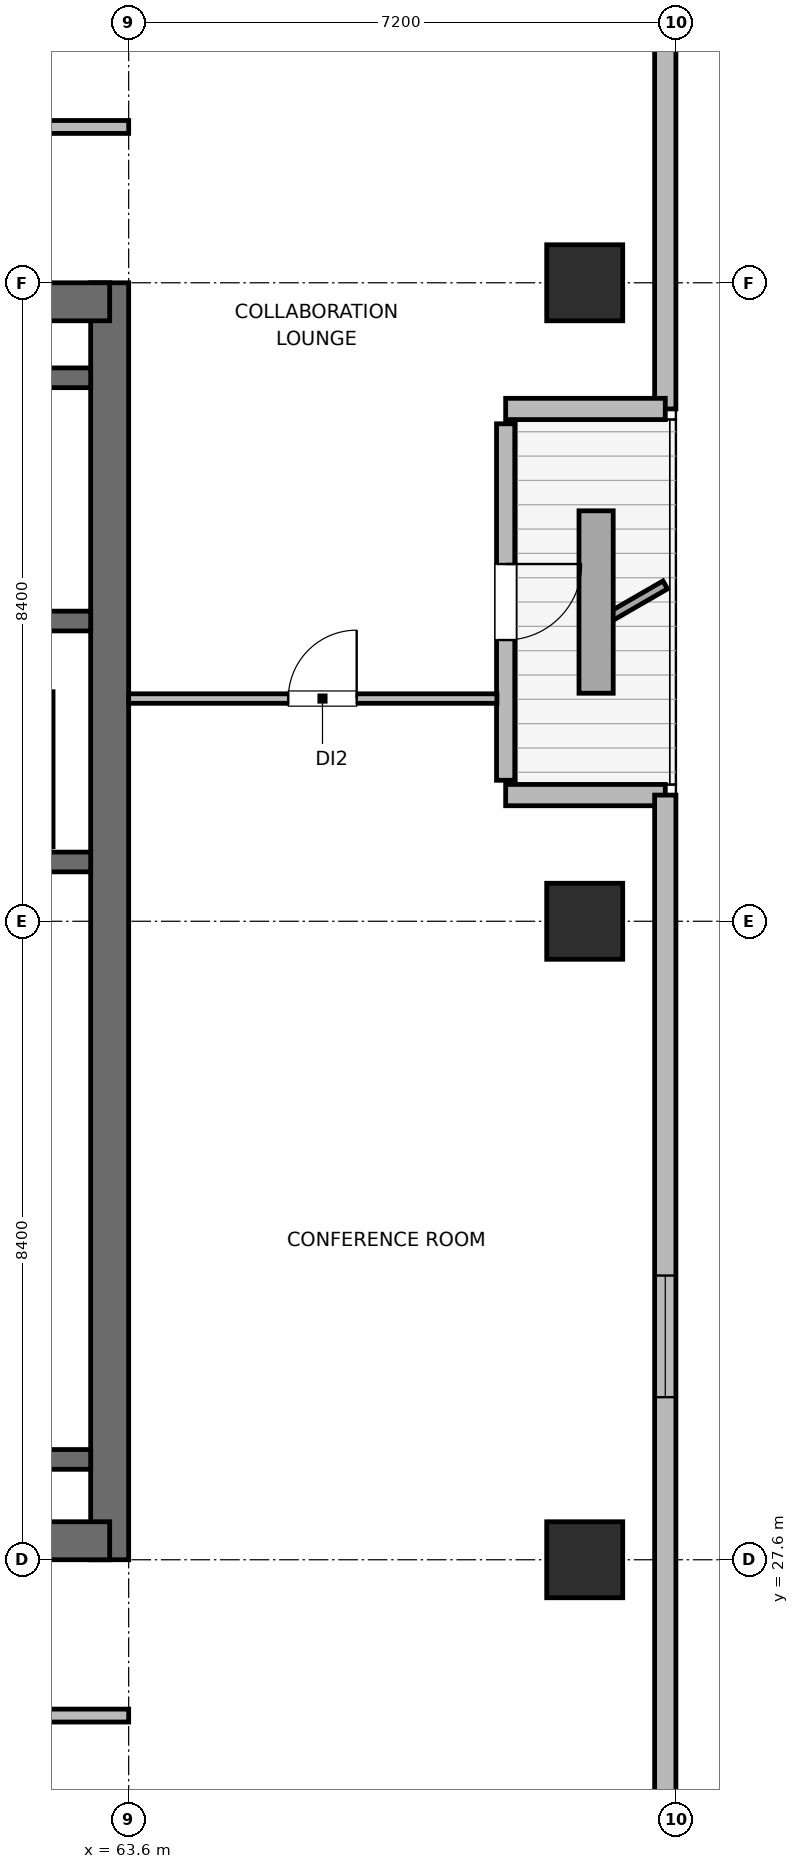
"""IFC4 building model, lengths in metres.
Left out: names, types, materials, properties, quantities, classifications, styles, units other than length and angle.
Written with IfcOpenShell. Run it as: python <this file> out.ifc"""

import sys

from ifc_helpers import new_model, si_unit, direction, frame, frame_2d, origin, origin_2d, place, context, subcontext, project, spatial, rectangle, extrude, element, fill, save


model = new_model("IFC4")
c1 = context("Model", 3, precision=1e-05, world=origin(), true_north=direction((0.0, 1.0)))
c2 = subcontext(c1, "Body", "Model", "MODEL_VIEW")
j1 = project(units=[si_unit("LENGTHUNIT", "METRE"), si_unit("PLANEANGLEUNIT", "RADIAN")], contexts=[c1])
p1 = place(None, origin())
s1 = spatial("IfcSite", under=j1, at=p1, CompositionType="ELEMENT")
p2 = place(p1, origin())
s2 = spatial("IfcBuilding", under=s1, at=p2, CompositionType="ELEMENT")
p3 = place(p2, frame((0.0, 0.0, 274.5)))
s3 = spatial("IfcBuildingStorey", under=s2, at=p3, CompositionType="ELEMENT", Elevation=274.5)
p4 = place(p3, frame((63.35, 27.6, 0.0), z_axis=(0.0, 0.0, 1.0), x_axis=(0.0, 1.0, 0.0)))
e1 = element("IfcWall", 1, at=p4, inside=s3, PredefinedType="SHEAR", context=c2, shape_type="SweptSolid", body=[
    extrude(rectangle(XDim=16.8, YDim=0.5, at=frame_2d((8.4, 0.0))), origin(), (0.0, 0.0, 1.0), 3.9),
])
p5 = place(p3, frame((53.85, 27.85, 0.0), z_axis=(0.0, 0.0, 1.0), x_axis=(1.0, 0.0, 0.0)))
e2 = element("IfcWall", 2, at=p5, inside=s3, PredefinedType="SHEAR", context=c2, shape_type="SweptSolid", body=[
    extrude(rectangle(XDim=9.5, YDim=0.5, at=frame_2d((4.75, 0.0))), origin(), (0.0, 0.0, 1.0), 3.9),
])
p6 = place(p5, frame((4.025, 0.0, 0.0)))
e3 = element("IfcOpeningElement", 3, at=p6, cuts=e2, PredefinedType="OPENING", context=c2, shape_type="SweptSolid", body=[
    extrude(rectangle(XDim=1.05, YDim=2.04, at=frame_2d((0.525, 1.02))), frame((0.0, 0.26, 0.0), z_axis=(0.0, -1.0, 0.0), x_axis=(1.0, 0.0, 0.0)), (0.0, 0.0, 1.0), 0.52),
])
p7 = place(p3, frame((53.85, 44.15, 0.0), z_axis=(0.0, 0.0, 1.0), x_axis=(1.0, 0.0, 0.0)))
e4 = element("IfcWall", 4, at=p7, inside=s3, PredefinedType="SHEAR", context=c2, shape_type="SweptSolid", body=[
    extrude(rectangle(XDim=9.5, YDim=0.5, at=frame_2d((4.75, 0.0))), origin(), (0.0, 0.0, 1.0), 3.9),
])
for number, where, z_axis, x_axis in (
    (5, (58.89, 28.92, 0.0), (0.0, 0.0, 1.0), (1.0, 0.0, 0.0)),
    (6, (58.89, 36.78, 0.0), (0.0, 0.0, 1.0), (1.0, 0.0, 0.0)),
):
    element("IfcWall", number, at=place(p3, frame(where, z_axis=z_axis, x_axis=x_axis)), inside=s3, PredefinedType="SHEAR", context=c2, shape_type="SweptSolid", body=[
        extrude(rectangle(XDim=4.21, YDim=0.26, at=frame_2d((2.105, 0.0))), origin(), (0.0, 0.0, 1.0), 3.9),
    ])
p8 = place(p3, frame((54.1, 39.95, 0.0), z_axis=(0.0, 0.0, 1.0), x_axis=(1.0, 0.0, 0.0)))
e7 = element("IfcWall", 7, at=p8, inside=s3, PredefinedType="SHEAR", context=c2, shape_type="SweptSolid", body=[
    extrude(rectangle(XDim=9.0, YDim=0.26, at=frame_2d((4.5, 0.0))), origin(), (0.0, 0.0, 1.0), 3.9),
])
p9 = place(p8, frame((1.1, 0.0, 0.0)))
e8 = element("IfcOpeningElement", 8, at=p9, cuts=e7, PredefinedType="OPENING", context=c2, shape_type="SweptSolid", body=[
    extrude(rectangle(XDim=1.0, YDim=2.04, at=frame_2d((0.5, 1.02))), frame((0.0, 0.14, 0.0), z_axis=(0.0, -1.0, 0.0), x_axis=(1.0, 0.0, 0.0)), (0.0, 0.0, 1.0), 0.28),
])
p10 = place(p3, frame((54.1, 43.15, 0.0), z_axis=(0.0, 0.0, 1.0), x_axis=(1.0, 0.0, 0.0)))
e9 = element("IfcWall", 9, at=p10, inside=s3, PredefinedType="SHEAR", context=c2, shape_type="SweptSolid", body=[
    extrude(rectangle(XDim=9.0, YDim=0.26, at=frame_2d((4.5, 0.0))), origin(), (0.0, 0.0, 1.0), 3.9),
])
for number, where, z_axis, x_axis in (
    (10, (69.6, 27.6, 0.0), (0.0, 0.0, 1.0), (1.0, 0.0, 0.0)),
    (11, (69.6, 36.0, 0.0), (0.0, 0.0, 1.0), (1.0, 0.0, 0.0)),
    (12, (69.6, 44.4, 0.0), (0.0, 0.0, 1.0), (1.0, 0.0, 0.0)),
):
    element("IfcColumn", number, at=place(p3, frame(where, z_axis=z_axis, x_axis=x_axis)), inside=s3, PredefinedType="COLUMN", context=c2, shape_type="SweptSolid", body=[
        extrude(rectangle(XDim=1.0, YDim=1.0, at=origin_2d()), origin(), (0.0, 0.0, 1.0), 3.9),
    ])
p11 = place(p3, frame((70.66, 48.582, 0.0), z_axis=(0.0, 0.0, 1.0), x_axis=(0.0, -1.0, 0.0)))
e13 = element("IfcWall", 13, at=p11, inside=s3, PredefinedType="SOLIDWALL", context=c2, shape_type="SweptSolid", body=[
    extrude(rectangle(XDim=5.842, YDim=0.28, at=frame_2d((2.921, 0.0))), origin(), (0.0, 0.0, 1.0), 3.68),
])
p12 = place(p3, frame((70.66, 42.74, 0.0), z_axis=(0.0, 0.0, 1.0), x_axis=(-1.0, 0.0, 0.0)))
e14 = element("IfcWall", 14, at=p12, inside=s3, PredefinedType="SOLIDWALL", context=c2, shape_type="SweptSolid", body=[
    extrude(rectangle(XDim=2.1, YDim=0.28, at=frame_2d((1.05, 0.0))), origin(), (0.0, 0.0, 1.0), 3.126),
])
p13 = place(p3, frame((68.56, 42.545, 0.0), z_axis=(0.0, 0.0, 1.0), x_axis=(0.0, -1.0, 0.0)))
e15 = element("IfcWall", 15, at=p13, inside=s3, PredefinedType="SOLIDWALL", context=c2, shape_type="SweptSolid", body=[
    extrude(rectangle(XDim=4.69, YDim=0.24, at=frame_2d((2.345, 0.0))), origin(), (0.0, 0.0, 1.0), 3.311),
])
p14 = place(p13, frame((1.845, 0.0, 0.0)))
e16 = element("IfcOpeningElement", 16, at=p14, cuts=e15, PredefinedType="OPENING", context=c2, shape_type="SweptSolid", body=[
    extrude(rectangle(XDim=1.0, YDim=2.02, at=frame_2d((0.5, 1.01))), frame((0.0, 0.13, 0.0), z_axis=(0.0, -1.0, 0.0), x_axis=(1.0, 0.0, 0.0)), (0.0, 0.0, 1.0), 0.26),
])
p15 = place(p3, frame((68.56, 37.66, 0.0), z_axis=(0.0, 0.0, 1.0), x_axis=(1.0, 0.0, 0.0)))
e17 = element("IfcWall", 17, at=p15, inside=s3, PredefinedType="SOLIDWALL", context=c2, shape_type="SweptSolid", body=[
    extrude(rectangle(XDim=2.1, YDim=0.28, at=frame_2d((1.05, 0.0))), origin(), (0.0, 0.0, 1.0), 3.126),
])
p16 = place(p3, frame((70.66, 37.66, 0.0), z_axis=(0.0, 0.0, 1.0), x_axis=(0.0, -1.0, 0.0)))
e18 = element("IfcWall", 18, at=p16, inside=s3, PredefinedType="SOLIDWALL", context=c2, shape_type="SweptSolid", body=[
    extrude(rectangle(XDim=14.241, YDim=0.28, at=frame_2d((7.121, 0.0))), origin(), (0.0, 0.0, 1.0), 3.68),
])
p17 = place(p16, frame((6.321, 0.0, 0.85)))
e19 = element("IfcOpeningElement", 19, at=p17, cuts=e18, PredefinedType="OPENING", context=c2, shape_type="SweptSolid", body=[
    extrude(rectangle(XDim=1.6, YDim=1.0, at=frame_2d((0.8, 0.5))), frame((0.0, 0.15, 0.0), z_axis=(0.0, -1.0, 0.0), x_axis=(1.0, 0.0, 0.0)), (0.0, 0.0, 1.0), 0.3),
])
p18 = place(p3, frame((62.5, 36.98, 0.0), z_axis=(0.0, 0.0, 1.0), x_axis=(0.0, 1.0, 0.0)))
e20 = element("IfcWall", 20, at=p18, inside=s3, PredefinedType="PARTITIONING", context=c2, shape_type="SweptSolid", body=[
    extrude(rectangle(XDim=2.04, YDim=0.21, at=frame_2d((1.02, 0.0))), origin(), (0.0, 0.0, 1.0), 3.68),
])
p19 = place(p3, frame((30.35, 25.55, 0.0), z_axis=(0.0, 0.0, 1.0), x_axis=(1.0, 0.0, 0.0)))
e21 = element("IfcWall", 21, at=p19, inside=s3, PredefinedType="PARTITIONING", context=c2, shape_type="SweptSolid", body=[
    extrude(rectangle(XDim=33.25, YDim=0.17, at=frame_2d((16.625, 0.0))), origin(), (0.0, 0.0, 1.0), 3.68),
])
p20 = place(p19, frame((5.95, 0.0, 0.0)))
e22 = element("IfcOpeningElement", 22, at=p20, cuts=e21, PredefinedType="OPENING", context=c2, shape_type="SweptSolid", body=[
    extrude(rectangle(XDim=0.95, YDim=2.04, at=frame_2d((0.475, 1.02))), frame((0.0, 0.095, 0.0), z_axis=(0.0, -1.0, 0.0), x_axis=(1.0, 0.0, 0.0)), (0.0, 0.0, 1.0), 0.19),
])
p21 = place(p19, frame((22.575, 0.0, 0.0)))
e23 = element("IfcOpeningElement", 23, at=p21, cuts=e21, PredefinedType="OPENING", context=c2, shape_type="SweptSolid", body=[
    extrude(rectangle(XDim=0.95, YDim=2.04, at=frame_2d((0.475, 1.02))), frame((0.0, 0.095, 0.0), z_axis=(0.0, -1.0, 0.0), x_axis=(1.0, 0.0, 0.0)), (0.0, 0.0, 1.0), 0.19),
])
p22 = place(p3, frame((30.35, 46.45, 0.0), z_axis=(0.0, 0.0, 1.0), x_axis=(1.0, 0.0, 0.0)))
e24 = element("IfcWall", 24, at=p22, inside=s3, PredefinedType="PARTITIONING", context=c2, shape_type="SweptSolid", body=[
    extrude(rectangle(XDim=33.25, YDim=0.17, at=frame_2d((16.625, 0.0))), origin(), (0.0, 0.0, 1.0), 3.68),
])
p23 = place(p22, frame((2.35, 0.0, 0.0)))
e25 = element("IfcOpeningElement", 25, at=p23, cuts=e24, PredefinedType="OPENING", context=c2, shape_type="SweptSolid", body=[
    extrude(rectangle(XDim=0.95, YDim=2.04, at=frame_2d((0.475, 1.02))), frame((0.0, 0.095, 0.0), z_axis=(0.0, -1.0, 0.0), x_axis=(1.0, 0.0, 0.0)), (0.0, 0.0, 1.0), 0.19),
])
p24 = place(p22, frame((7.275, 0.0, 0.0)))
e26 = element("IfcOpeningElement", 26, at=p24, cuts=e24, PredefinedType="OPENING", context=c2, shape_type="SweptSolid", body=[
    extrude(rectangle(XDim=0.95, YDim=2.04, at=frame_2d((0.475, 1.02))), frame((0.0, 0.095, 0.0), z_axis=(0.0, -1.0, 0.0), x_axis=(1.0, 0.0, 0.0)), (0.0, 0.0, 1.0), 0.19),
])
p25 = place(p22, frame((12.475, 0.0, 0.0)))
e27 = element("IfcOpeningElement", 27, at=p25, cuts=e24, PredefinedType="OPENING", context=c2, shape_type="SweptSolid", body=[
    extrude(rectangle(XDim=0.95, YDim=2.04, at=frame_2d((0.475, 1.02))), frame((0.0, 0.095, 0.0), z_axis=(0.0, -1.0, 0.0), x_axis=(1.0, 0.0, 0.0)), (0.0, 0.0, 1.0), 0.19),
])
p26 = place(p22, frame((18.175, 0.0, 0.0)))
e28 = element("IfcOpeningElement", 28, at=p26, cuts=e24, PredefinedType="OPENING", context=c2, shape_type="SweptSolid", body=[
    extrude(rectangle(XDim=0.95, YDim=2.04, at=frame_2d((0.475, 1.02))), frame((0.0, 0.095, 0.0), z_axis=(0.0, -1.0, 0.0), x_axis=(1.0, 0.0, 0.0)), (0.0, 0.0, 1.0), 0.19),
])
p27 = place(p22, frame((23.175, 0.0, 0.0)))
e29 = element("IfcOpeningElement", 29, at=p27, cuts=e24, PredefinedType="OPENING", context=c2, shape_type="SweptSolid", body=[
    extrude(rectangle(XDim=0.95, YDim=2.04, at=frame_2d((0.475, 1.02))), frame((0.0, 0.095, 0.0), z_axis=(0.0, -1.0, 0.0), x_axis=(1.0, 0.0, 0.0)), (0.0, 0.0, 1.0), 0.19),
])
p28 = place(p22, frame((27.675, 0.0, 0.0)))
e30 = element("IfcOpeningElement", 30, at=p28, cuts=e24, PredefinedType="OPENING", context=c2, shape_type="SweptSolid", body=[
    extrude(rectangle(XDim=0.95, YDim=2.04, at=frame_2d((0.475, 1.02))), frame((0.0, 0.095, 0.0), z_axis=(0.0, -1.0, 0.0), x_axis=(1.0, 0.0, 0.0)), (0.0, 0.0, 1.0), 0.19),
])
p29 = place(p22, frame((31.275, 0.0, 0.0)))
e31 = element("IfcOpeningElement", 31, at=p29, cuts=e24, PredefinedType="OPENING", context=c2, shape_type="SweptSolid", body=[
    extrude(rectangle(XDim=0.95, YDim=2.04, at=frame_2d((0.475, 1.02))), frame((0.0, 0.095, 0.0), z_axis=(0.0, -1.0, 0.0), x_axis=(1.0, 0.0, 0.0)), (0.0, 0.0, 1.0), 0.19),
])
p30 = place(p3, frame((63.6, 38.93, 0.0), z_axis=(0.0, 0.0, 1.0), x_axis=(1.0, 0.0, 0.0)))
e32 = element("IfcWall", 32, at=p30, inside=s3, PredefinedType="PARTITIONING", context=c2, shape_type="SweptSolid", body=[
    extrude(rectangle(XDim=4.845, YDim=0.125, at=frame_2d((2.422, 0.0))), origin(), (0.0, 0.0, 1.0), 3.68),
])
p31 = place(p30, frame((2.1, 0.0, 0.0)))
e33 = element("IfcOpeningElement", 33, at=p31, cuts=e32, PredefinedType="OPENING", context=c2, shape_type="SweptSolid", body=[
    extrude(rectangle(XDim=0.9, YDim=2.02, at=frame_2d((0.45, 1.01))), frame((0.0, 0.073, 0.0), z_axis=(0.0, -1.0, 0.0), x_axis=(1.0, 0.0, 0.0)), (0.0, 0.0, 1.0), 0.145),
])
p32 = place(p14, origin())
e34 = element("IfcDoor", 34, at=p32, inside=s3, OperationType="SINGLE_SWING_LEFT", PredefinedType="DOOR", context=c2, shape_type="SweptSolid", body=[
    extrude(rectangle(XDim=1.0, YDim=2.02, at=frame_2d((0.5, 1.01))), frame((0.0, 0.025, 0.0), z_axis=(0.0, -1.0, 0.0), x_axis=(1.0, 0.0, 0.0)), (0.0, 0.0, 1.0), 0.05),
])
fill(e16, e34)
p33 = place(p17, origin())
e35 = element("IfcWindow", 35, at=p33, inside=s3, PartitioningType="SINGLE_PANEL", PredefinedType="WINDOW", context=c2, shape_type="SweptSolid", body=[
    extrude(rectangle(XDim=1.6, YDim=1.0, at=frame_2d((0.8, 0.5))), frame((0.0, 0.03, 0.0), z_axis=(0.0, -1.0, 0.0), x_axis=(1.0, 0.0, 0.0)), (0.0, 0.0, 1.0), 0.06),
])
fill(e19, e35)
p34 = place(p31, origin())
e36 = element("IfcDoor", 36, at=p34, inside=s3, OperationType="SINGLE_SWING_RIGHT", PredefinedType="DOOR", context=c2, shape_type="SweptSolid", body=[
    extrude(rectangle(XDim=0.9, YDim=2.02, at=frame_2d((0.45, 1.01))), frame((0.0, 0.025, 0.0), z_axis=(0.0, -1.0, 0.0), x_axis=(1.0, 0.0, 0.0)), (0.0, 0.0, 1.0), 0.05),
])
fill(e33, e36)
save(model, sys.argv[1])
